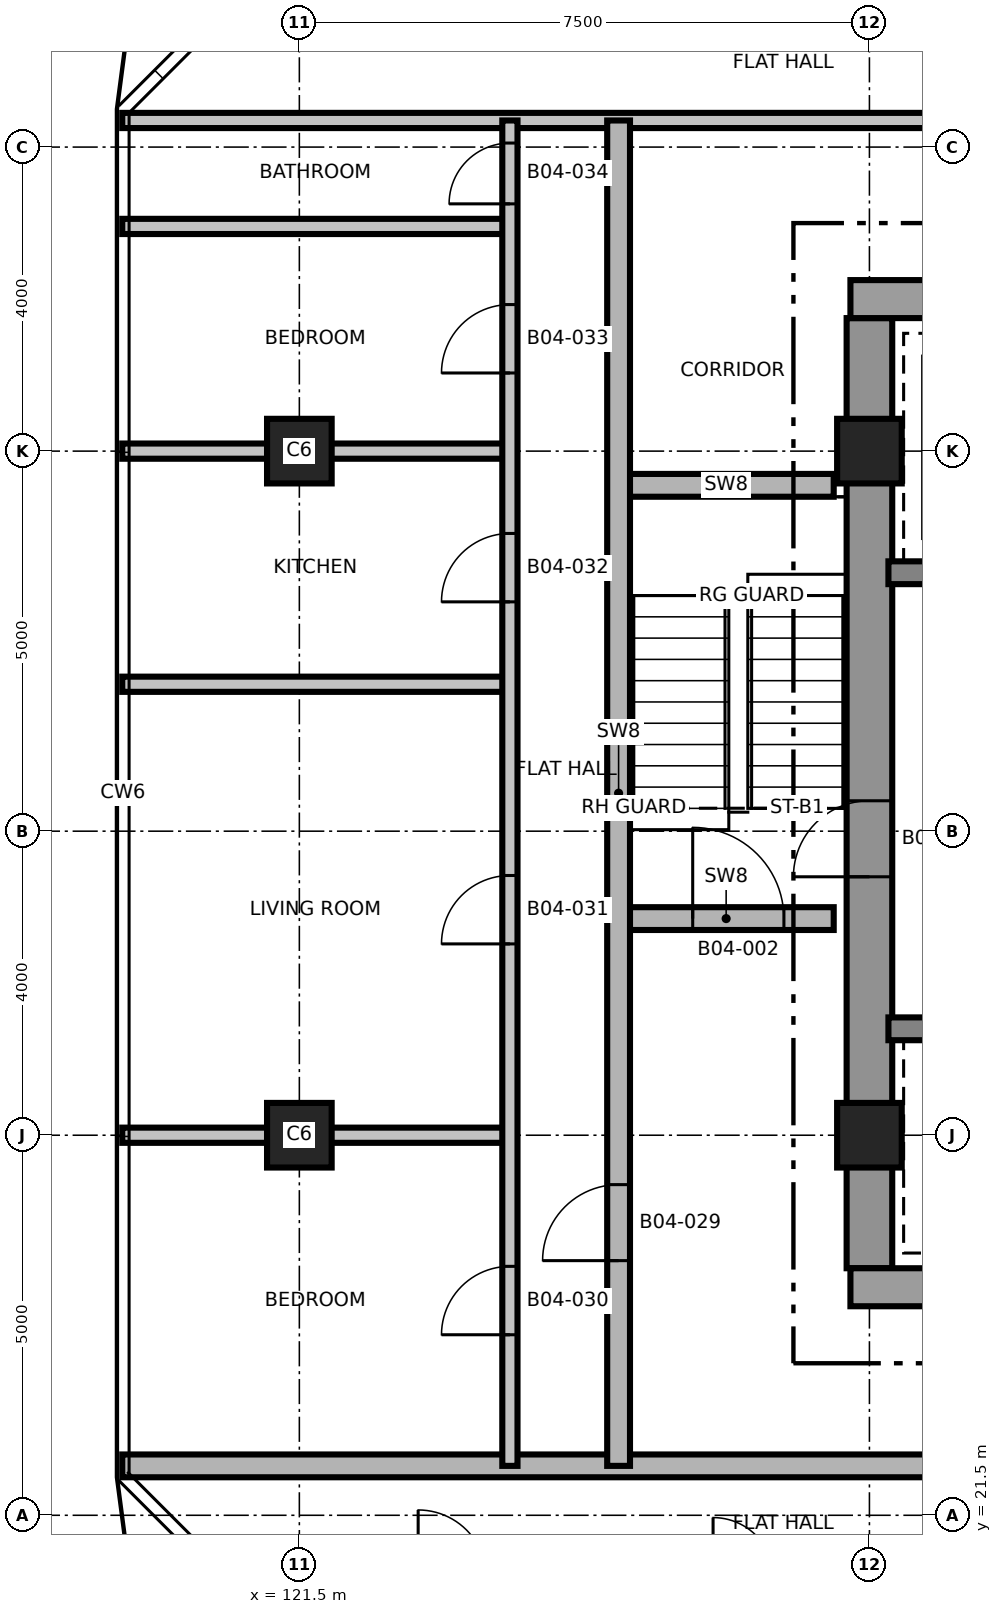
"""IFC4 building model, lengths in metres.
Left out: names, types, materials, properties, quantities, classifications, styles, units other than length and angle.
Written with IfcOpenShell. Run it as: python <this file> out.ifc"""

import sys

from ifc_helpers import new_model, si_unit, direction, frame, frame_2d, origin, origin_2d, place, context, subcontext, project, spatial, rectangle, extrude, element, fill, save


model = new_model("IFC4")
c1 = context("Model", 3, precision=1e-05, world=origin(), true_north=direction((0.0, 1.0)))
c2 = subcontext(c1, "Body", "Model", "MODEL_VIEW")
j1 = project(units=[si_unit("LENGTHUNIT", "METRE"), si_unit("PLANEANGLEUNIT", "RADIAN")], contexts=[c1])
p1 = place(None, origin())
s1 = spatial("IfcSite", under=j1, at=p1, CompositionType="ELEMENT")
p2 = place(p1, origin())
s2 = spatial("IfcBuilding", under=s1, at=p2, CompositionType="ELEMENT")
p3 = place(p2, frame((0.0, 0.0, 63.1)))
s3 = spatial("IfcBuildingStorey", under=s2, at=p3, CompositionType="ELEMENT", Elevation=63.1)
p4 = place(p3, frame((129.0, 24.75, 0.0), z_axis=(0.0, 0.0, 1.0), x_axis=(0.0, 1.0, 0.0)))
e1 = element("IfcWall", 1, at=p4, inside=s3, PredefinedType="SHEAR", context=c2, shape_type="SweptSolid", body=[
    extrude(rectangle(XDim=12.5, YDim=0.6, at=frame_2d((6.25, 0.0))), origin(), (0.0, 0.0, 1.0), 3.7),
])
p5 = place(p4, frame((5.15, 0.0, 0.0)))
e2 = element("IfcOpeningElement", 2, at=p5, cuts=e1, PredefinedType="OPENING", context=c2, shape_type="SweptSolid", body=[
    extrude(rectangle(XDim=1.0, YDim=2.1, at=frame_2d((0.5, 1.05))), frame((0.0, 0.31, 0.0), z_axis=(0.0, -1.0, 0.0), x_axis=(1.0, 0.0, 0.0)), (0.0, 0.0, 1.0), 0.62),
])
p6 = place(p3, frame((128.75, 24.5, 0.0), z_axis=(0.0, 0.0, 1.0), x_axis=(1.0, 0.0, 0.0)))
e3 = element("IfcWall", 3, at=p6, inside=s3, PredefinedType="SHEAR", context=c2, shape_type="SweptSolid", body=[
    extrude(rectangle(XDim=15.0, YDim=0.5, at=frame_2d((7.5, 0.0))), origin(), (0.0, 0.0, 1.0), 3.7),
])
p7 = place(p6, frame((9.65, 0.0, 0.0)))
e4 = element("IfcOpeningElement", 4, at=p7, cuts=e3, PredefinedType="OPENING", context=c2, shape_type="SweptSolid", body=[
    extrude(rectangle(XDim=1.5, YDim=2.1, at=frame_2d((0.75, 1.05))), frame((0.0, 0.26, 0.0), z_axis=(0.0, -1.0, 0.0), x_axis=(1.0, 0.0, 0.0)), (0.0, 0.0, 1.0), 0.52),
])
p8 = place(p6, frame((1.25, 0.0, 0.0)))
e5 = element("IfcOpeningElement", 5, at=p8, cuts=e3, PredefinedType="OPENING", context=c2, shape_type="SweptSolid", body=[
    extrude(rectangle(XDim=0.9, YDim=2.1, at=frame_2d((0.45, 1.05))), frame((0.0, 0.26, 0.0), z_axis=(0.0, -1.0, 0.0), x_axis=(1.0, 0.0, 0.0)), (0.0, 0.0, 1.0), 0.52),
])
p9 = place(p3, frame((128.75, 37.5, 0.0), z_axis=(0.0, 0.0, 1.0), x_axis=(1.0, 0.0, 0.0)))
e6 = element("IfcWall", 6, at=p9, inside=s3, PredefinedType="SHEAR", context=c2, shape_type="SweptSolid", body=[
    extrude(rectangle(XDim=15.0, YDim=0.5, at=frame_2d((7.5, 0.0))), origin(), (0.0, 0.0, 1.0), 3.7),
])
p10 = place(p9, frame((9.65, 0.0, 0.0)))
e7 = element("IfcOpeningElement", 7, at=p10, cuts=e6, PredefinedType="OPENING", context=c2, shape_type="SweptSolid", body=[
    extrude(rectangle(XDim=1.5, YDim=2.1, at=frame_2d((0.75, 1.05))), frame((0.0, 0.26, 0.0), z_axis=(0.0, -1.0, 0.0), x_axis=(1.0, 0.0, 0.0)), (0.0, 0.0, 1.0), 0.52),
])
p11 = place(p9, frame((12.85, 0.0, 0.0)))
e8 = element("IfcOpeningElement", 8, at=p11, cuts=e6, PredefinedType="OPENING", context=c2, shape_type="SweptSolid", body=[
    extrude(rectangle(XDim=0.9, YDim=2.1, at=frame_2d((0.45, 1.05))), frame((0.0, 0.26, 0.0), z_axis=(0.0, -1.0, 0.0), x_axis=(1.0, 0.0, 0.0)), (0.0, 0.0, 1.0), 0.52),
])
p12 = place(p9, frame((3.6, 0.0, 0.0)))
e9 = element("IfcOpeningElement", 9, at=p12, cuts=e6, PredefinedType="OPENING", context=c2, shape_type="SweptSolid", body=[
    extrude(rectangle(XDim=0.9, YDim=2.1, at=frame_2d((0.45, 1.05))), frame((0.0, 0.26, 0.0), z_axis=(0.0, -1.0, 0.0), x_axis=(1.0, 0.0, 0.0)), (0.0, 0.0, 1.0), 0.52),
])
p13 = place(p9, frame((6.5, 0.0, 0.0)))
e10 = element("IfcOpeningElement", 10, at=p13, cuts=e6, PredefinedType="OPENING", context=c2, shape_type="SweptSolid", body=[
    extrude(rectangle(XDim=0.9, YDim=2.1, at=frame_2d((0.45, 1.05))), frame((0.0, 0.26, 0.0), z_axis=(0.0, -1.0, 0.0), x_axis=(1.0, 0.0, 0.0)), (0.0, 0.0, 1.0), 0.52),
])
p14 = place(p3, frame((129.25, 27.9, 0.0), z_axis=(0.0, 0.0, 1.0), x_axis=(1.0, 0.0, 0.0)))
e11 = element("IfcWall", 11, at=p14, inside=s3, PredefinedType="SHEAR", context=c2, shape_type="SweptSolid", body=[
    extrude(rectangle(XDim=2.7, YDim=0.3, at=frame_2d((1.35, 0.0))), origin(), (0.0, 0.0, 1.0), 3.7),
])
p15 = place(p3, frame((129.25, 33.9, 0.0), z_axis=(0.0, 0.0, 1.0), x_axis=(1.0, 0.0, 0.0)))
e12 = element("IfcWall", 12, at=p15, inside=s3, PredefinedType="SHEAR", context=c2, shape_type="SweptSolid", body=[
    extrude(rectangle(XDim=2.7, YDim=0.3, at=frame_2d((1.35, 0.0))), origin(), (0.0, 0.0, 1.0), 3.7),
])
p16 = place(p15, frame((1.05, 0.0, 0.0)))
e13 = element("IfcOpeningElement", 13, at=p16, cuts=e12, PredefinedType="OPENING", context=c2, shape_type="SweptSolid", body=[
    extrude(rectangle(XDim=1.3, YDim=2.4, at=frame_2d((0.65, 1.2))), frame((0.0, 0.16, 0.0), z_axis=(0.0, -1.0, 0.0), x_axis=(1.0, 0.0, 0.0)), (0.0, 0.0, 1.0), 0.32),
])
for number, where, z_axis, x_axis in (
    (14, (121.5, 26.5, 0.0), (0.0, 0.0, 1.0), (1.0, 0.0, 0.0)),
    (15, (129.0, 26.5, 0.0), (0.0, 0.0, 1.0), (1.0, 0.0, 0.0)),
    (16, (121.5, 35.5, 0.0), (0.0, 0.0, 1.0), (1.0, 0.0, 0.0)),
    (17, (129.0, 35.5, 0.0), (0.0, 0.0, 1.0), (1.0, 0.0, 0.0)),
):
    element("IfcColumn", number, at=place(p3, frame(where, z_axis=z_axis, x_axis=x_axis)), inside=s3, PredefinedType="COLUMN", context=c2, shape_type="SweptSolid", body=[
        extrude(rectangle(XDim=0.85, YDim=0.85, at=origin_2d()), origin(), (0.0, 0.0, 1.0), 3.7),
    ])
p17 = place(p3, frame((119.17, 22.15, 0.0), z_axis=(0.0, 0.0, 1.0), x_axis=(1.0, 0.0, 0.0)))
e18 = element("IfcWall", 18, at=p17, inside=s3, PredefinedType="SHEAR", context=c2, shape_type="SweptSolid", body=[
    extrude(rectangle(XDim=34.66, YDim=0.3, at=frame_2d((17.33, 0.0))), origin(), (0.0, 0.0, 1.0), 3.4),
])
p18 = place(p17, frame((23.58, 0.0, 0.0)))
e19 = element("IfcOpeningElement", 19, at=p18, cuts=e18, PredefinedType="OPENING", context=c2, shape_type="SweptSolid", body=[
    extrude(rectangle(XDim=1.0, YDim=2.1, at=frame_2d((0.5, 1.05))), frame((0.0, 0.16, 0.0), z_axis=(0.0, -1.0, 0.0), x_axis=(1.0, 0.0, 0.0)), (0.0, 0.0, 1.0), 0.32),
])
p19 = place(p17, frame((11.93, 0.0, 0.0)))
e20 = element("IfcOpeningElement", 20, at=p19, cuts=e18, PredefinedType="OPENING", context=c2, shape_type="SweptSolid", body=[
    extrude(rectangle(XDim=1.0, YDim=2.1, at=frame_2d((0.5, 1.05))), frame((0.0, 0.16, 0.0), z_axis=(0.0, -1.0, 0.0), x_axis=(1.0, 0.0, 0.0)), (0.0, 0.0, 1.0), 0.32),
])
p20 = place(p17, frame((25.48, 0.0, 0.0)))
e21 = element("IfcOpeningElement", 21, at=p20, cuts=e18, PredefinedType="OPENING", context=c2, shape_type="SweptSolid", body=[
    extrude(rectangle(XDim=1.0, YDim=2.1, at=frame_2d((0.5, 1.05))), frame((0.0, 0.16, 0.0), z_axis=(0.0, -1.0, 0.0), x_axis=(1.0, 0.0, 0.0)), (0.0, 0.0, 1.0), 0.32),
])
p21 = place(p17, frame((17.58, 0.0, 0.0)))
e22 = element("IfcOpeningElement", 22, at=p21, cuts=e18, PredefinedType="OPENING", context=c2, shape_type="SweptSolid", body=[
    extrude(rectangle(XDim=0.9, YDim=2.1, at=frame_2d((0.45, 1.05))), frame((0.0, 0.16, 0.0), z_axis=(0.0, -1.0, 0.0), x_axis=(1.0, 0.0, 0.0)), (0.0, 0.0, 1.0), 0.32),
])
p22 = place(p3, frame((119.17, 26.5, 0.0), z_axis=(0.0, 0.0, 1.0), x_axis=(1.0, 0.0, 0.0)))
e23 = element("IfcWall", 23, at=p22, inside=s3, PredefinedType="PARTITIONING", context=c2, shape_type="SweptSolid", body=[
    extrude(rectangle(XDim=5.1, YDim=0.2, at=frame_2d((2.55, 0.0))), origin(), (0.0, 0.0, 1.0), 3.4),
])
p23 = place(p3, frame((125.7, 29.35, 0.0), z_axis=(0.0, 0.0, 1.0), x_axis=(1.0, 0.0, 0.0)))
e24 = element("IfcWall", 24, at=p23, inside=s3, PredefinedType="SHEAR", context=c2, shape_type="SweptSolid", body=[
    extrude(rectangle(XDim=2.83, YDim=0.3, at=frame_2d((1.415, 0.0))), origin(), (0.0, 0.0, 1.0), 3.4),
])
p24 = place(p23, frame((0.975, 0.0, 0.0)))
e25 = element("IfcOpeningElement", 25, at=p24, cuts=e24, PredefinedType="OPENING", context=c2, shape_type="SweptSolid", body=[
    extrude(rectangle(XDim=1.2, YDim=2.1, at=frame_2d((0.6, 1.05))), frame((0.0, 0.16, 0.0), z_axis=(0.0, -1.0, 0.0), x_axis=(1.0, 0.0, 0.0)), (0.0, 0.0, 1.0), 0.32),
])
p25 = place(p3, frame((119.17, 32.433, 0.0), z_axis=(0.0, 0.0, 1.0), x_axis=(1.0, 0.0, 0.0)))
e26 = element("IfcWall", 26, at=p25, inside=s3, PredefinedType="PARTITIONING", context=c2, shape_type="SweptSolid", body=[
    extrude(rectangle(XDim=5.1, YDim=0.2, at=frame_2d((2.55, 0.0))), origin(), (0.0, 0.0, 1.0), 3.4),
])
p26 = place(p3, frame((125.7, 35.05, 0.0), z_axis=(0.0, 0.0, 1.0), x_axis=(1.0, 0.0, 0.0)))
e27 = element("IfcWall", 27, at=p26, inside=s3, PredefinedType="SHEAR", context=c2, shape_type="SweptSolid", body=[
    extrude(rectangle(XDim=2.83, YDim=0.3, at=frame_2d((1.415, 0.0))), origin(), (0.0, 0.0, 1.0), 3.4),
])
for number, where, z_axis, x_axis in (
    (28, (119.17, 35.5, 0.0), (0.0, 0.0, 1.0), (1.0, 0.0, 0.0)),
    (29, (119.17, 38.456, 0.0), (0.0, 0.0, 1.0), (1.0, 0.0, 0.0)),
):
    element("IfcWall", number, at=place(p3, frame(where, z_axis=z_axis, x_axis=x_axis)), inside=s3, PredefinedType="PARTITIONING", context=c2, shape_type="SweptSolid", body=[
        extrude(rectangle(XDim=5.1, YDim=0.2, at=frame_2d((2.55, 0.0))), origin(), (0.0, 0.0, 1.0), 3.4),
    ])
p27 = place(p3, frame((119.17, 39.85, 0.0), z_axis=(0.0, 0.0, 1.0), x_axis=(1.0, 0.0, 0.0)))
e30 = element("IfcWall", 30, at=p27, inside=s3, PredefinedType="PARTITIONING", context=c2, shape_type="SweptSolid", body=[
    extrude(rectangle(XDim=34.66, YDim=0.2, at=frame_2d((17.33, 0.0))), origin(), (0.0, 0.0, 1.0), 3.4),
])
p28 = place(p27, frame((11.93, 0.0, 0.0)))
e31 = element("IfcOpeningElement", 31, at=p28, cuts=e30, PredefinedType="OPENING", context=c2, shape_type="SweptSolid", body=[
    extrude(rectangle(XDim=1.0, YDim=2.1, at=frame_2d((0.5, 1.05))), frame((0.0, 0.11, 0.0), z_axis=(0.0, -1.0, 0.0), x_axis=(1.0, 0.0, 0.0)), (0.0, 0.0, 1.0), 0.22),
])
p29 = place(p27, frame((20.58, 0.0, 0.0)))
e32 = element("IfcOpeningElement", 32, at=p29, cuts=e30, PredefinedType="OPENING", context=c2, shape_type="SweptSolid", body=[
    extrude(rectangle(XDim=1.0, YDim=2.1, at=frame_2d((0.5, 1.05))), frame((0.0, 0.11, 0.0), z_axis=(0.0, -1.0, 0.0), x_axis=(1.0, 0.0, 0.0)), (0.0, 0.0, 1.0), 0.22),
])
p30 = place(p27, frame((25.48, 0.0, 0.0)))
e33 = element("IfcOpeningElement", 33, at=p30, cuts=e30, PredefinedType="OPENING", context=c2, shape_type="SweptSolid", body=[
    extrude(rectangle(XDim=1.0, YDim=2.1, at=frame_2d((0.5, 1.05))), frame((0.0, 0.11, 0.0), z_axis=(0.0, -1.0, 0.0), x_axis=(1.0, 0.0, 0.0)), (0.0, 0.0, 1.0), 0.22),
])
p31 = place(p3, frame((124.27, 22.15, 0.0), z_axis=(0.0, 0.0, 1.0), x_axis=(0.0, 1.0, 0.0)))
e34 = element("IfcWall", 34, at=p31, inside=s3, PredefinedType="PARTITIONING", context=c2, shape_type="SweptSolid", body=[
    extrude(rectangle(XDim=17.7, YDim=0.2, at=frame_2d((8.85, 0.0))), origin(), (0.0, 0.0, 1.0), 3.4),
])
p32 = place(p31, frame((1.725, 0.0, 0.0)))
e35 = element("IfcOpeningElement", 35, at=p32, cuts=e34, PredefinedType="OPENING", context=c2, shape_type="SweptSolid", body=[
    extrude(rectangle(XDim=0.9, YDim=2.1, at=frame_2d((0.45, 1.05))), frame((0.0, 0.11, 0.0), z_axis=(0.0, -1.0, 0.0), x_axis=(1.0, 0.0, 0.0)), (0.0, 0.0, 1.0), 0.22),
])
p33 = place(p31, frame((6.867, 0.0, 0.0)))
e36 = element("IfcOpeningElement", 36, at=p33, cuts=e34, PredefinedType="OPENING", context=c2, shape_type="SweptSolid", body=[
    extrude(rectangle(XDim=0.9, YDim=2.1, at=frame_2d((0.45, 1.05))), frame((0.0, 0.11, 0.0), z_axis=(0.0, -1.0, 0.0), x_axis=(1.0, 0.0, 0.0)), (0.0, 0.0, 1.0), 0.22),
])
p34 = place(p31, frame((11.367, 0.0, 0.0)))
e37 = element("IfcOpeningElement", 37, at=p34, cuts=e34, PredefinedType="OPENING", context=c2, shape_type="SweptSolid", body=[
    extrude(rectangle(XDim=0.9, YDim=2.1, at=frame_2d((0.45, 1.05))), frame((0.0, 0.11, 0.0), z_axis=(0.0, -1.0, 0.0), x_axis=(1.0, 0.0, 0.0)), (0.0, 0.0, 1.0), 0.22),
])
p35 = place(p31, frame((14.378, 0.0, 0.0)))
e38 = element("IfcOpeningElement", 38, at=p35, cuts=e34, PredefinedType="OPENING", context=c2, shape_type="SweptSolid", body=[
    extrude(rectangle(XDim=0.9, YDim=2.1, at=frame_2d((0.45, 1.05))), frame((0.0, 0.11, 0.0), z_axis=(0.0, -1.0, 0.0), x_axis=(1.0, 0.0, 0.0)), (0.0, 0.0, 1.0), 0.22),
])
p36 = place(p31, frame((16.603, 0.0, 0.0)))
e39 = element("IfcOpeningElement", 39, at=p36, cuts=e34, PredefinedType="OPENING", context=c2, shape_type="SweptSolid", body=[
    extrude(rectangle(XDim=0.8, YDim=2.1, at=frame_2d((0.4, 1.05))), frame((0.0, 0.11, 0.0), z_axis=(0.0, -1.0, 0.0), x_axis=(1.0, 0.0, 0.0)), (0.0, 0.0, 1.0), 0.22),
])
p37 = place(p3, frame((125.7, 22.15, 0.0), z_axis=(0.0, 0.0, 1.0), x_axis=(0.0, 1.0, 0.0)))
e40 = element("IfcWall", 40, at=p37, inside=s3, PredefinedType="SHEAR", context=c2, shape_type="SweptSolid", body=[
    extrude(rectangle(XDim=17.7, YDim=0.3, at=frame_2d((8.85, 0.0))), origin(), (0.0, 0.0, 1.0), 3.4),
])
p38 = place(p37, frame((2.7, 0.0, 0.0)))
e41 = element("IfcOpeningElement", 41, at=p38, cuts=e40, PredefinedType="OPENING", context=c2, shape_type="SweptSolid", body=[
    extrude(rectangle(XDim=1.0, YDim=2.1, at=frame_2d((0.5, 1.05))), frame((0.0, 0.16, 0.0), z_axis=(0.0, -1.0, 0.0), x_axis=(1.0, 0.0, 0.0)), (0.0, 0.0, 1.0), 0.32),
])
p39 = place(p24, origin())
e42 = element("IfcDoor", 42, at=p39, inside=s3, OperationType="SINGLE_SWING_RIGHT", PredefinedType="DOOR", context=c2, shape_type="SweptSolid", body=[
    extrude(rectangle(XDim=1.2, YDim=2.1, at=frame_2d((0.6, 1.05))), frame((0.0, 0.025, 0.0), z_axis=(0.0, -1.0, 0.0), x_axis=(1.0, 0.0, 0.0)), (0.0, 0.0, 1.0), 0.05),
])
fill(e25, e42)
p40 = place(p38, origin())
e43 = element("IfcDoor", 43, at=p40, inside=s3, OperationType="SINGLE_SWING_LEFT", PredefinedType="DOOR", context=c2, shape_type="SweptSolid", body=[
    extrude(rectangle(XDim=1.0, YDim=2.1, at=frame_2d((0.5, 1.05))), frame((0.0, 0.025, 0.0), z_axis=(0.0, -1.0, 0.0), x_axis=(1.0, 0.0, 0.0)), (0.0, 0.0, 1.0), 0.05),
])
fill(e41, e43)
p41 = place(p32, origin())
e44 = element("IfcDoor", 44, at=p41, inside=s3, OperationType="SINGLE_SWING_RIGHT", PredefinedType="DOOR", context=c2, shape_type="SweptSolid", body=[
    extrude(rectangle(XDim=0.9, YDim=2.1, at=frame_2d((0.45, 1.05))), frame((0.0, 0.025, 0.0), z_axis=(0.0, -1.0, 0.0), x_axis=(1.0, 0.0, 0.0)), (0.0, 0.0, 1.0), 0.05),
])
fill(e35, e44)
p42 = place(p33, origin())
e45 = element("IfcDoor", 45, at=p42, inside=s3, OperationType="SINGLE_SWING_LEFT", PredefinedType="DOOR", context=c2, shape_type="SweptSolid", body=[
    extrude(rectangle(XDim=0.9, YDim=2.1, at=frame_2d((0.45, 1.05))), frame((0.0, 0.025, 0.0), z_axis=(0.0, -1.0, 0.0), x_axis=(1.0, 0.0, 0.0)), (0.0, 0.0, 1.0), 0.05),
])
fill(e36, e45)
p43 = place(p34, origin())
e46 = element("IfcDoor", 46, at=p43, inside=s3, OperationType="SINGLE_SWING_RIGHT", PredefinedType="DOOR", context=c2, shape_type="SweptSolid", body=[
    extrude(rectangle(XDim=0.9, YDim=2.1, at=frame_2d((0.45, 1.05))), frame((0.0, 0.025, 0.0), z_axis=(0.0, -1.0, 0.0), x_axis=(1.0, 0.0, 0.0)), (0.0, 0.0, 1.0), 0.05),
])
fill(e37, e46)
p44 = place(p35, origin())
e47 = element("IfcDoor", 47, at=p44, inside=s3, OperationType="SINGLE_SWING_LEFT", PredefinedType="DOOR", context=c2, shape_type="SweptSolid", body=[
    extrude(rectangle(XDim=0.9, YDim=2.1, at=frame_2d((0.45, 1.05))), frame((0.0, 0.025, 0.0), z_axis=(0.0, -1.0, 0.0), x_axis=(1.0, 0.0, 0.0)), (0.0, 0.0, 1.0), 0.05),
])
fill(e38, e47)
p45 = place(p36, origin())
e48 = element("IfcDoor", 48, at=p45, inside=s3, OperationType="SINGLE_SWING_RIGHT", PredefinedType="DOOR", context=c2, shape_type="SweptSolid", body=[
    extrude(rectangle(XDim=0.8, YDim=2.1, at=frame_2d((0.4, 1.05))), frame((0.0, 0.025, 0.0), z_axis=(0.0, -1.0, 0.0), x_axis=(1.0, 0.0, 0.0)), (0.0, 0.0, 1.0), 0.05),
])
fill(e39, e48)
p46 = place(p5, origin())
e49 = element("IfcDoor", 49, at=p46, inside=s3, OperationType="SINGLE_SWING_RIGHT", PredefinedType="DOOR", context=c2, shape_type="SweptSolid", body=[
    extrude(rectangle(XDim=1.0, YDim=2.1, at=frame_2d((0.5, 1.05))), frame((0.0, 0.025, 0.0), z_axis=(0.0, -1.0, 0.0), x_axis=(1.0, 0.0, 0.0)), (0.0, 0.0, 1.0), 0.05),
])
fill(e2, e49)
save(model, sys.argv[1])
